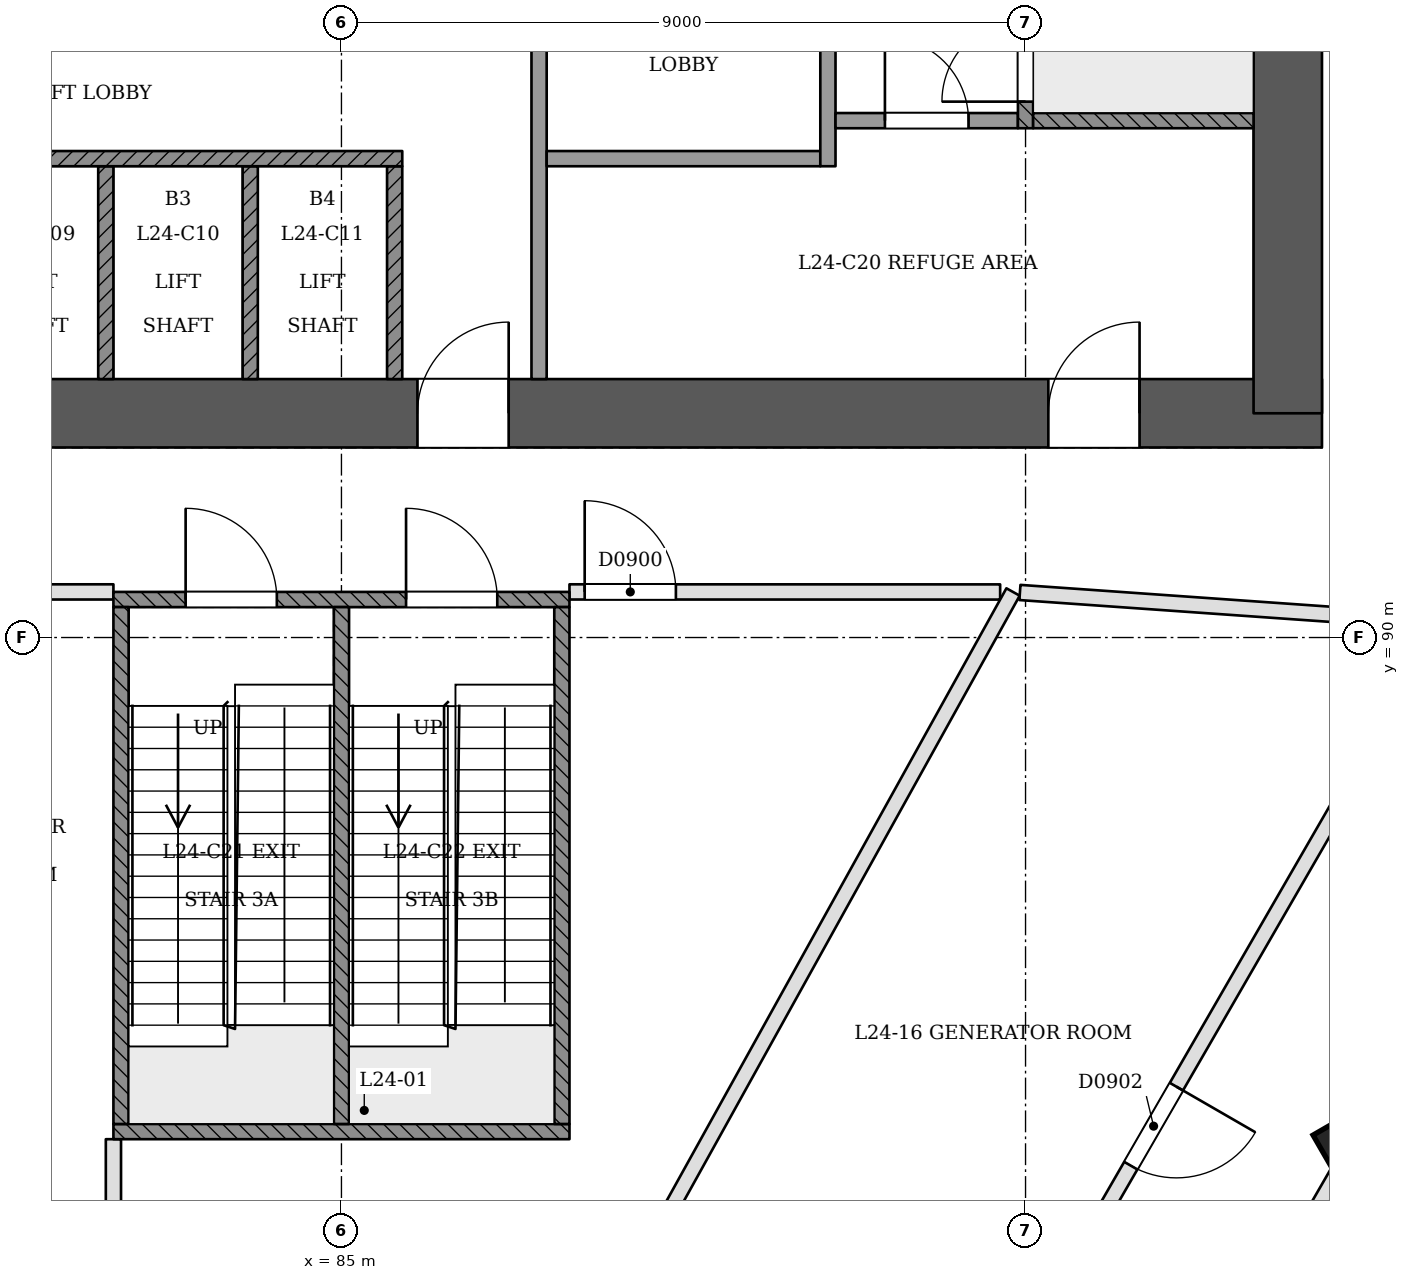
"""IFC4 building model, lengths in metres.
Left out: names, types, materials, properties, quantities, classifications, styles, units other than length and angle.
Written with IfcOpenShell. Run it as: python <this file> out.ifc"""

import sys

from ifc_helpers import new_model, si_unit, direction, frame, frame_2d, origin, origin_2d, place, context, subcontext, project, spatial, rectangle, extrude, element, fill, save


model = new_model("IFC4")
c1 = context("Model", 3, precision=1e-05, world=origin(), true_north=direction((0.0, 1.0)))
c2 = subcontext(c1, "Body", "Model", "MODEL_VIEW")
j1 = project(units=[si_unit("LENGTHUNIT", "METRE"), si_unit("PLANEANGLEUNIT", "RADIAN")], contexts=[c1])
p1 = place(None, origin())
s1 = spatial("IfcSite", under=j1, at=p1, CompositionType="ELEMENT")
p2 = place(p1, origin())
s2 = spatial("IfcBuilding", under=s1, at=p2, CompositionType="ELEMENT")
p3 = place(p2, frame((0.0, 0.0, 95.4)))
s3 = spatial("IfcBuildingStorey", under=s2, at=p3, CompositionType="ELEMENT", Elevation=95.4)
p4 = place(p3, frame((72.55, 92.95, 0.0), z_axis=(0.0, 0.0, 1.0), x_axis=(1.0, 0.0, 0.0)))
e1 = element("IfcWall", 1, at=p4, inside=s3, PredefinedType="SHEAR", context=c2, shape_type="SweptSolid", body=[
    extrude(rectangle(XDim=25.35, YDim=0.9, at=frame_2d((12.675, 0.0))), origin(), (0.0, 0.0, 1.0), 5.4),
])
p5 = place(p4, frame((1.25, 0.0, 0.0)))
e2 = element("IfcOpeningElement", 2, at=p5, cuts=e1, PredefinedType="OPENING", context=c2, shape_type="SweptSolid", body=[
    extrude(rectangle(XDim=1.2, YDim=2.1, at=frame_2d((0.6, 1.05))), frame((0.0, 0.46, 0.0), z_axis=(0.0, -1.0, 0.0), x_axis=(1.0, 0.0, 0.0)), (0.0, 0.0, 1.0), 0.921),
])
p6 = place(p4, frame((3.45, 0.0, 0.0)))
e3 = element("IfcOpeningElement", 3, at=p6, cuts=e1, PredefinedType="OPENING", context=c2, shape_type="SweptSolid", body=[
    extrude(rectangle(XDim=1.2, YDim=2.1, at=frame_2d((0.6, 1.05))), frame((0.0, 0.46, 0.0), z_axis=(0.0, -1.0, 0.0), x_axis=(1.0, 0.0, 0.0)), (0.0, 0.0, 1.0), 0.921),
])
p7 = place(p4, frame((13.45, 0.0, 0.0)))
e4 = element("IfcOpeningElement", 4, at=p7, cuts=e1, PredefinedType="OPENING", context=c2, shape_type="SweptSolid", body=[
    extrude(rectangle(XDim=1.2, YDim=2.1, at=frame_2d((0.6, 1.05))), frame((0.0, 0.46, 0.0), z_axis=(0.0, -1.0, 0.0), x_axis=(1.0, 0.0, 0.0)), (0.0, 0.0, 1.0), 0.921),
])
p8 = place(p4, frame((21.75, 0.0, 0.0)))
e5 = element("IfcOpeningElement", 5, at=p8, cuts=e1, PredefinedType="OPENING", context=c2, shape_type="SweptSolid", body=[
    extrude(rectangle(XDim=1.2, YDim=2.1, at=frame_2d((0.6, 1.05))), frame((0.0, 0.46, 0.0), z_axis=(0.0, -1.0, 0.0), x_axis=(1.0, 0.0, 0.0)), (0.0, 0.0, 1.0), 0.921),
])
p9 = place(p3, frame((97.45, 92.95, 0.0), z_axis=(0.0, 0.0, 1.0), x_axis=(0.0, 1.0, 0.0)))
e6 = element("IfcWall", 6, at=p9, inside=s3, PredefinedType="SHEAR", context=c2, shape_type="SweptSolid", body=[
    extrude(rectangle(XDim=11.35, YDim=0.9, at=frame_2d((5.675, 0.0))), origin(), (0.0, 0.0, 1.0), 5.4),
])
p10 = place(p3, frame((98.288, 83.279, -0.021), z_axis=(-0.02222134892, 0.038480872521, 0.999012229206), x_axis=(-0.500171495747, -0.865641283205, 0.022218092924)))
e7 = element("IfcColumn", 7, at=p10, inside=s3, PredefinedType="COLUMN", context=c2, shape_type="SweptSolid", body=[
    extrude(rectangle(XDim=0.7, YDim=0.7, at=origin_2d()), origin(), (0.0, 0.0, 1.0), 5.406),
])
p11 = place(p3, frame((85.516, 61.158, 0.0), z_axis=(0.0, 0.0, 1.0), x_axis=(0.499997295205, 0.866026965393, 0.0)))
e8 = element("IfcWall", 8, at=p11, inside=s3, PredefinedType="PARTITIONING", context=c2, shape_type="SweptSolid", body=[
    extrude(rectangle(XDim=42.086, YDim=0.2, at=frame_2d((21.043, 0.0))), origin(), (0.0, 0.0, 1.0), 4.5),
])
p12 = place(p11, frame((0.2, 0.0, 0.0)))
e9 = element("IfcOpeningElement", 9, at=p12, cuts=e8, PredefinedType="OPENING", context=c2, shape_type="SweptSolid", body=[
    extrude(rectangle(XDim=1.2, YDim=2.4, at=frame_2d((0.6, 1.2))), frame((0.0, 0.11, 0.0), z_axis=(0.0, -1.0, 0.0), x_axis=(1.0, 0.0, 0.0)), (0.0, 0.0, 1.0), 0.221),
])
p13 = place(p11, frame((9.193, 0.0, 0.0)))
e10 = element("IfcOpeningElement", 10, at=p13, cuts=e8, PredefinedType="OPENING", context=c2, shape_type="SweptSolid", body=[
    extrude(rectangle(XDim=1.2, YDim=2.4, at=frame_2d((0.6, 1.2))), frame((0.0, 0.11, 0.0), z_axis=(0.0, -1.0, 0.0), x_axis=(1.0, 0.0, 0.0)), (0.0, 0.0, 1.0), 0.221),
])
p14 = place(p11, frame((20.443, 0.0, 0.0)))
e11 = element("IfcOpeningElement", 11, at=p14, cuts=e8, PredefinedType="OPENING", context=c2, shape_type="SweptSolid", body=[
    extrude(rectangle(XDim=1.2, YDim=2.4, at=frame_2d((0.6, 1.2))), frame((0.0, 0.11, 0.0), z_axis=(0.0, -1.0, 0.0), x_axis=(1.0, 0.0, 0.0)), (0.0, 0.0, 1.0), 0.221),
])
p15 = place(p11, frame((29.443, 0.0, 0.0)))
e12 = element("IfcOpeningElement", 12, at=p15, cuts=e8, PredefinedType="OPENING", context=c2, shape_type="SweptSolid", body=[
    extrude(rectangle(XDim=1.2, YDim=2.4, at=frame_2d((0.6, 1.2))), frame((0.0, 0.11, 0.0), z_axis=(0.0, -1.0, 0.0), x_axis=(1.0, 0.0, 0.0)), (0.0, 0.0, 1.0), 0.221),
])
p16 = place(p11, frame((40.184, 0.0, 0.0)))
e13 = element("IfcOpeningElement", 13, at=p16, cuts=e8, PredefinedType="OPENING", context=c2, shape_type="SweptSolid", body=[
    extrude(rectangle(XDim=1.2, YDim=2.4, at=frame_2d((0.6, 1.2))), frame((0.0, 0.11, 0.0), z_axis=(0.0, -1.0, 0.0), x_axis=(1.0, 0.0, 0.0)), (0.0, 0.0, 1.0), 0.221),
])
p17 = place(p3, frame((88.0, 90.6, 0.0), z_axis=(0.0, 0.0, 1.0), x_axis=(0.999999985146, -0.000172361785, 0.0)))
e14 = element("IfcWall", 14, at=p17, inside=s3, PredefinedType="PARTITIONING", context=c2, shape_type="SweptSolid", body=[
    extrude(rectangle(XDim=5.666, YDim=0.2, at=frame_2d((2.833, 0.0))), origin(), (0.0, 0.0, 1.0), 4.9),
])
p18 = place(p17, frame((0.2, 0.0, 0.0)))
e15 = element("IfcOpeningElement", 15, at=p18, cuts=e14, PredefinedType="OPENING", context=c2, shape_type="SweptSolid", body=[
    extrude(rectangle(XDim=1.2, YDim=2.4, at=frame_2d((0.6, 1.2))), frame((0.0, 0.11, 0.0), z_axis=(0.0, -1.0, 0.0), x_axis=(1.0, 0.0, 0.0)), (0.0, 0.0, 1.0), 0.221),
])
p19 = place(p3, frame((99.512, 90.2, 0.0), z_axis=(0.0, 0.0, 1.0), x_axis=(-0.500003030662, -0.866023654024, 0.0)))
e16 = element("IfcWall", 16, at=p19, inside=s3, PredefinedType="PARTITIONING", context=c2, shape_type="SweptSolid", body=[
    extrude(rectangle(XDim=29.024, YDim=0.2, at=frame_2d((14.512, 0.0))), origin(), (0.0, 0.0, 1.0), 4.9),
])
p20 = place(p19, frame((20.272, 0.0, 0.0)))
e17 = element("IfcOpeningElement", 17, at=p20, cuts=e16, PredefinedType="OPENING", context=c2, shape_type="SweptSolid", body=[
    extrude(rectangle(XDim=1.2, YDim=2.4, at=frame_2d((0.6, 1.2))), frame((0.0, 0.11, 0.0), z_axis=(0.0, -1.0, 0.0), x_axis=(1.0, 0.0, 0.0)), (0.0, 0.0, 1.0), 0.221),
])
p21 = place(p19, frame((7.054, 0.0, 0.0)))
e18 = element("IfcOpeningElement", 18, at=p21, cuts=e16, PredefinedType="OPENING", context=c2, shape_type="SweptSolid", body=[
    extrude(rectangle(XDim=1.2, YDim=2.4, at=frame_2d((0.6, 1.2))), frame((0.0, 0.11, 0.0), z_axis=(0.0, -1.0, 0.0), x_axis=(1.0, 0.0, 0.0)), (0.0, 0.0, 1.0), 0.221),
])
p22 = place(p3, frame((93.926, 90.593, 0.0), z_axis=(0.0, 0.0, 1.0), x_axis=(0.997539607827, -0.07010514116, 0.0)))
e19 = element("IfcWall", 19, at=p22, inside=s3, PredefinedType="PARTITIONING", context=c2, shape_type="SweptSolid", body=[
    extrude(rectangle(XDim=5.44, YDim=0.2, at=frame_2d((2.72, 0.0))), origin(), (0.0, 0.0, 1.0), 4.9),
])
p23 = place(p3, frame((84.913, 65.215, 0.0), z_axis=(0.0, 0.0, 1.0), x_axis=(-0.500003495781, 0.866023385485, 0.0)))
e20 = element("IfcWall", 20, at=p23, inside=s3, PredefinedType="PARTITIONING", context=c2, shape_type="SweptSolid", body=[
    extrude(rectangle(XDim=28.85, YDim=0.2, at=frame_2d((14.425, 0.0))), origin(), (0.0, 0.0, 1.0), 4.9),
])
p24 = place(p23, frame((13.337, 0.0, 0.0)))
e21 = element("IfcOpeningElement", 21, at=p24, cuts=e20, PredefinedType="OPENING", context=c2, shape_type="SweptSolid", body=[
    extrude(rectangle(XDim=1.2, YDim=2.4, at=frame_2d((0.6, 1.2))), frame((0.0, 0.11, 0.0), z_axis=(0.0, -1.0, 0.0), x_axis=(1.0, 0.0, 0.0)), (0.0, 0.0, 1.0), 0.221),
])
p25 = place(p23, frame((22.85, 0.0, 0.0)))
e22 = element("IfcOpeningElement", 22, at=p25, cuts=e20, PredefinedType="OPENING", context=c2, shape_type="SweptSolid", body=[
    extrude(rectangle(XDim=1.2, YDim=2.4, at=frame_2d((0.6, 1.2))), frame((0.0, 0.11, 0.0), z_axis=(0.0, -1.0, 0.0), x_axis=(1.0, 0.0, 0.0)), (0.0, 0.0, 1.0), 0.221),
])
p26 = place(p3, frame((77.142, 90.599, 0.0), z_axis=(0.0, 0.0, 1.0), x_axis=(0.999999979792, 0.000201035328, 0.0)))
e23 = element("IfcWall", 23, at=p26, inside=s3, PredefinedType="PARTITIONING", context=c2, shape_type="SweptSolid", body=[
    extrude(rectangle(XDim=4.858, YDim=0.2, at=frame_2d((2.429, 0.0))), origin(), (0.0, 0.0, 1.0), 4.9),
])
p27 = place(p26, frame((2.628, 0.0, 0.0)))
e24 = element("IfcOpeningElement", 24, at=p27, cuts=e23, PredefinedType="OPENING", context=c2, shape_type="SweptSolid", body=[
    extrude(rectangle(XDim=1.2, YDim=2.4, at=frame_2d((0.6, 1.2))), frame((0.0, 0.11, 0.0), z_axis=(0.0, -1.0, 0.0), x_axis=(1.0, 0.0, 0.0)), (0.0, 0.0, 1.0), 0.221),
])
p28 = place(p3, frame((88.157, 80.363, 0.0), z_axis=(0.0, 0.0, 1.0), x_axis=(0.485129297726, 0.874442430631, 0.0)))
e25 = element("IfcWall", 25, at=p28, inside=s3, PredefinedType="PARTITIONING", context=c2, shape_type="SweptSolid", body=[
    extrude(rectangle(XDim=11.706, YDim=0.2, at=frame_2d((5.853, 0.0))), origin(), (0.0, 0.0, 1.0), 4.9),
])
p29 = place(p3, frame((82.0, 83.4, 0.0), z_axis=(0.0, 0.0, 1.0), x_axis=(0.0, -1.0, 0.0)))
e26 = element("IfcWall", 26, at=p29, inside=s3, PredefinedType="PARTITIONING", context=c2, shape_type="SweptSolid", body=[
    extrude(rectangle(XDim=2.768, YDim=0.2, at=frame_2d((1.384, 0.0))), origin(), (0.0, 0.0, 1.0), 4.9),
])
p30 = place(p3, frame((82.0, 80.122, 0.0), z_axis=(0.0, 0.0, 1.0), x_axis=(-0.377263817801, 0.926105831845, 0.0)))
e27 = element("IfcWall", 27, at=p30, inside=s3, PredefinedType="PARTITIONING", context=c2, shape_type="SweptSolid", body=[
    extrude(rectangle(XDim=4.925, YDim=0.2, at=frame_2d((2.462, 0.0))), origin(), (0.0, 0.0, 1.0), 4.9),
])
for number, where, z_axis, x_axis in (
    (28, (81.9, 93.4, 0.0), (0.0, 0.0, 1.0), (0.0, 1.0, 0.0)),
    (29, (83.8, 93.4, 0.0), (0.0, 0.0, 1.0), (0.0, 1.0, 0.0)),
    (30, (85.7, 93.4, 0.0), (0.0, 0.0, 1.0), (0.0, 1.0, 0.0)),
):
    element("IfcWall", number, at=place(p3, frame(where, z_axis=z_axis, x_axis=x_axis)), inside=s3, PredefinedType="SOLIDWALL", context=c2, shape_type="SweptSolid", body=[
        extrude(rectangle(XDim=2.8, YDim=0.2, at=frame_2d((1.4, 0.0))), origin(), (0.0, 0.0, 1.0), 4.9),
    ])
p31 = place(p3, frame((87.6, 93.4, 0.0), z_axis=(0.0, 0.0, 1.0), x_axis=(0.0, 1.0, 0.0)))
e31 = element("IfcWall", 31, at=p31, inside=s3, PredefinedType="PARTITIONING", context=c2, shape_type="SweptSolid", body=[
    extrude(rectangle(XDim=7.0, YDim=0.2, at=frame_2d((3.5, 0.0))), origin(), (0.0, 0.0, 1.0), 4.9),
])
p32 = place(p31, frame((4.45, 0.0, 0.0)))
e32 = element("IfcOpeningElement", 32, at=p32, cuts=e31, PredefinedType="OPENING", context=c2, shape_type="SweptSolid", body=[
    extrude(rectangle(XDim=1.1, YDim=2.1, at=frame_2d((0.55, 1.05))), frame((0.0, 0.11, 0.0), z_axis=(0.0, -1.0, 0.0), x_axis=(1.0, 0.0, 0.0)), (0.0, 0.0, 1.0), 0.221),
])
p33 = place(p3, frame((78.0, 96.3, 0.0), z_axis=(0.0, 0.0, 1.0), x_axis=(1.0, 0.0, 0.0)))
e33 = element("IfcWall", 33, at=p33, inside=s3, PredefinedType="SOLIDWALL", context=c2, shape_type="SweptSolid", body=[
    extrude(rectangle(XDim=7.8, YDim=0.2, at=frame_2d((3.9, 0.0))), origin(), (0.0, 0.0, 1.0), 4.9),
])
p34 = place(p3, frame((87.7, 96.3, 0.0), z_axis=(0.0, 0.0, 1.0), x_axis=(1.0, 0.0, 0.0)))
e34 = element("IfcWall", 34, at=p34, inside=s3, PredefinedType="PARTITIONING", context=c2, shape_type="SweptSolid", body=[
    extrude(rectangle(XDim=3.6, YDim=0.2, at=frame_2d((1.8, 0.0))), origin(), (0.0, 0.0, 1.0), 4.9),
])
p35 = place(p3, frame((91.4, 96.2, 0.0), z_axis=(0.0, 0.0, 1.0), x_axis=(0.0, 1.0, 0.0)))
e35 = element("IfcWall", 35, at=p35, inside=s3, PredefinedType="PARTITIONING", context=c2, shape_type="SweptSolid", body=[
    extrude(rectangle(XDim=4.2, YDim=0.2, at=frame_2d((2.1, 0.0))), origin(), (0.0, 0.0, 1.0), 4.9),
])
p36 = place(p35, frame((2.45, 0.0, 0.0)))
e36 = element("IfcOpeningElement", 36, at=p36, cuts=e35, PredefinedType="OPENING", context=c2, shape_type="SweptSolid", body=[
    extrude(rectangle(XDim=1.1, YDim=2.1, at=frame_2d((0.55, 1.05))), frame((0.0, 0.11, 0.0), z_axis=(0.0, -1.0, 0.0), x_axis=(1.0, 0.0, 0.0)), (0.0, 0.0, 1.0), 0.221),
])
p37 = place(p3, frame((91.5, 96.8, 0.0), z_axis=(0.0, 0.0, 1.0), x_axis=(1.0, 0.0, 0.0)))
e37 = element("IfcWall", 37, at=p37, inside=s3, PredefinedType="PARTITIONING", context=c2, shape_type="SweptSolid", body=[
    extrude(rectangle(XDim=2.4, YDim=0.2, at=frame_2d((1.2, 0.0))), origin(), (0.0, 0.0, 1.0), 4.9),
])
p38 = place(p37, frame((0.65, 0.0, 0.0)))
e38 = element("IfcOpeningElement", 38, at=p38, cuts=e37, PredefinedType="OPENING", context=c2, shape_type="SweptSolid", body=[
    extrude(rectangle(XDim=1.1, YDim=2.1, at=frame_2d((0.55, 1.05))), frame((0.0, 0.11, 0.0), z_axis=(0.0, -1.0, 0.0), x_axis=(1.0, 0.0, 0.0)), (0.0, 0.0, 1.0), 0.221),
])
p39 = place(p3, frame((94.0, 96.7, 0.0), z_axis=(0.0, 0.0, 1.0), x_axis=(0.0, 1.0, 0.0)))
e39 = element("IfcWall", 39, at=p39, inside=s3, PredefinedType="SOLIDWALL", context=c2, shape_type="SweptSolid", body=[
    extrude(rectangle(XDim=3.7, YDim=0.2, at=frame_2d((1.85, 0.0))), origin(), (0.0, 0.0, 1.0), 4.9),
])
p40 = place(p39, frame((0.35, 0.0, 0.0)))
e40 = element("IfcOpeningElement", 40, at=p40, cuts=e39, PredefinedType="OPENING", context=c2, shape_type="SweptSolid", body=[
    extrude(rectangle(XDim=1.1, YDim=2.1, at=frame_2d((0.55, 1.05))), frame((0.0, 0.11, 0.0), z_axis=(0.0, -1.0, 0.0), x_axis=(1.0, 0.0, 0.0)), (0.0, 0.0, 1.0), 0.221),
])
p41 = place(p3, frame((94.1, 96.8, 0.0), z_axis=(0.0, 0.0, 1.0), x_axis=(1.0, 0.0, 0.0)))
e41 = element("IfcWall", 41, at=p41, inside=s3, PredefinedType="SOLIDWALL", context=c2, shape_type="SweptSolid", body=[
    extrude(rectangle(XDim=2.9, YDim=0.2, at=frame_2d((1.45, 0.0))), origin(), (0.0, 0.0, 1.0), 4.9),
])
p42 = place(p3, frame((82.0, 90.5, 0.0), z_axis=(0.0, 0.0, 1.0), x_axis=(1.0, 0.0, 0.0)))
e42 = element("IfcWall", 42, at=p42, inside=s3, PredefinedType="SOLIDWALL", context=c2, shape_type="SweptSolid", body=[
    extrude(rectangle(XDim=6.0, YDim=0.2, at=frame_2d((3.0, 0.0))), origin(), (0.0, 0.0, 1.0), 4.9),
])
p43 = place(p42, frame((0.95, 0.0, 0.0)))
e43 = element("IfcOpeningElement", 43, at=p43, cuts=e42, PredefinedType="OPENING", context=c2, shape_type="SweptSolid", body=[
    extrude(rectangle(XDim=1.2, YDim=2.1, at=frame_2d((0.6, 1.05))), frame((0.0, 0.11, 0.0), z_axis=(0.0, -1.0, 0.0), x_axis=(1.0, 0.0, 0.0)), (0.0, 0.0, 1.0), 0.221),
])
p44 = place(p42, frame((3.85, 0.0, 0.0)))
e44 = element("IfcOpeningElement", 44, at=p44, cuts=e42, PredefinedType="OPENING", context=c2, shape_type="SweptSolid", body=[
    extrude(rectangle(XDim=1.2, YDim=2.1, at=frame_2d((0.6, 1.05))), frame((0.0, 0.11, 0.0), z_axis=(0.0, -1.0, 0.0), x_axis=(1.0, 0.0, 0.0)), (0.0, 0.0, 1.0), 0.221),
])
p45 = place(p3, frame((82.0, 83.5, 0.0), z_axis=(0.0, 0.0, 1.0), x_axis=(1.0, 0.0, 0.0)))
e45 = element("IfcWall", 45, at=p45, inside=s3, PredefinedType="SOLIDWALL", context=c2, shape_type="SweptSolid", body=[
    extrude(rectangle(XDim=6.0, YDim=0.2, at=frame_2d((3.0, 0.0))), origin(), (0.0, 0.0, 1.0), 4.9),
])
for number, where, z_axis, x_axis in (
    (46, (82.1, 83.6, 0.0), (0.0, 0.0, 1.0), (0.0, 1.0, 0.0)),
    (47, (87.9, 83.6, 0.0), (0.0, 0.0, 1.0), (0.0, 1.0, 0.0)),
    (48, (85.0, 83.6, 0.0), (0.0, 0.0, 1.0), (0.0, 1.0, 0.0)),
):
    element("IfcWall", number, at=place(p3, frame(where, z_axis=z_axis, x_axis=x_axis)), inside=s3, PredefinedType="SOLIDWALL", context=c2, shape_type="SweptSolid", body=[
        extrude(rectangle(XDim=6.8, YDim=0.2, at=frame_2d((3.4, 0.0))), origin(), (0.0, 0.0, 1.0), 4.9),
    ])
p46 = place(p18, origin())
e49 = element("IfcDoor", 49, at=p46, inside=s3, OperationType="SINGLE_SWING_LEFT", PredefinedType="NOTDEFINED", context=c2, shape_type="SweptSolid", body=[
    extrude(rectangle(XDim=1.2, YDim=2.4, at=frame_2d((0.6, 1.2))), frame((0.0, 0.025, 0.0), z_axis=(0.0, -1.0, 0.0), x_axis=(1.0, 0.0, 0.0)), (0.0, 0.0, 1.0), 0.05),
])
fill(e15, e49)
p47 = place(p21, origin())
e50 = element("IfcDoor", 50, at=p47, inside=s3, OperationType="SINGLE_SWING_LEFT", PredefinedType="NOTDEFINED", context=c2, shape_type="SweptSolid", body=[
    extrude(rectangle(XDim=1.2, YDim=2.4, at=frame_2d((0.6, 1.2))), frame((0.0, 0.025, 0.0), z_axis=(0.0, -1.0, 0.0), x_axis=(1.0, 0.0, 0.0)), (0.0, 0.0, 1.0), 0.05),
])
fill(e18, e50)
p48 = place(p40, origin())
e51 = element("IfcDoor", 51, at=p48, inside=s3, OperationType="SINGLE_SWING_LEFT", PredefinedType="NOTDEFINED", context=c2, shape_type="SweptSolid", body=[
    extrude(rectangle(XDim=1.1, YDim=2.1, at=frame_2d((0.55, 1.05))), frame((0.0, 0.025, 0.0), z_axis=(0.0, -1.0, 0.0), x_axis=(1.0, 0.0, 0.0)), (0.0, 0.0, 1.0), 0.05),
])
fill(e40, e51)
p49 = place(p7, origin())
e52 = element("IfcDoor", 52, at=p49, inside=s3, OperationType="SINGLE_SWING_RIGHT", PredefinedType="NOTDEFINED", context=c2, shape_type="SweptSolid", body=[
    extrude(rectangle(XDim=1.2, YDim=2.1, at=frame_2d((0.6, 1.05))), frame((0.0, 0.025, 0.0), z_axis=(0.0, -1.0, 0.0), x_axis=(1.0, 0.0, 0.0)), (0.0, 0.0, 1.0), 0.05),
])
fill(e4, e52)
p50 = place(p8, origin())
e53 = element("IfcDoor", 53, at=p50, inside=s3, OperationType="SINGLE_SWING_RIGHT", PredefinedType="NOTDEFINED", context=c2, shape_type="SweptSolid", body=[
    extrude(rectangle(XDim=1.2, YDim=2.1, at=frame_2d((0.6, 1.05))), frame((0.0, 0.025, 0.0), z_axis=(0.0, -1.0, 0.0), x_axis=(1.0, 0.0, 0.0)), (0.0, 0.0, 1.0), 0.05),
])
fill(e5, e53)
p51 = place(p38, origin())
e54 = element("IfcDoor", 54, at=p51, inside=s3, OperationType="SINGLE_SWING_LEFT", PredefinedType="NOTDEFINED", context=c2, shape_type="SweptSolid", body=[
    extrude(rectangle(XDim=1.1, YDim=2.1, at=frame_2d((0.55, 1.05))), frame((0.0, 0.025, 0.0), z_axis=(0.0, -1.0, 0.0), x_axis=(1.0, 0.0, 0.0)), (0.0, 0.0, 1.0), 0.05),
])
fill(e38, e54)
p52 = place(p43, origin())
e55 = element("IfcDoor", 55, at=p52, inside=s3, OperationType="SINGLE_SWING_LEFT", PredefinedType="NOTDEFINED", context=c2, shape_type="SweptSolid", body=[
    extrude(rectangle(XDim=1.2, YDim=2.1, at=frame_2d((0.6, 1.05))), frame((0.0, 0.025, 0.0), z_axis=(0.0, -1.0, 0.0), x_axis=(1.0, 0.0, 0.0)), (0.0, 0.0, 1.0), 0.05),
])
fill(e43, e55)
p53 = place(p44, origin())
e56 = element("IfcDoor", 56, at=p53, inside=s3, OperationType="SINGLE_SWING_LEFT", PredefinedType="NOTDEFINED", context=c2, shape_type="SweptSolid", body=[
    extrude(rectangle(XDim=1.2, YDim=2.1, at=frame_2d((0.6, 1.05))), frame((0.0, 0.025, 0.0), z_axis=(0.0, -1.0, 0.0), x_axis=(1.0, 0.0, 0.0)), (0.0, 0.0, 1.0), 0.05),
])
fill(e44, e56)
save(model, sys.argv[1])
